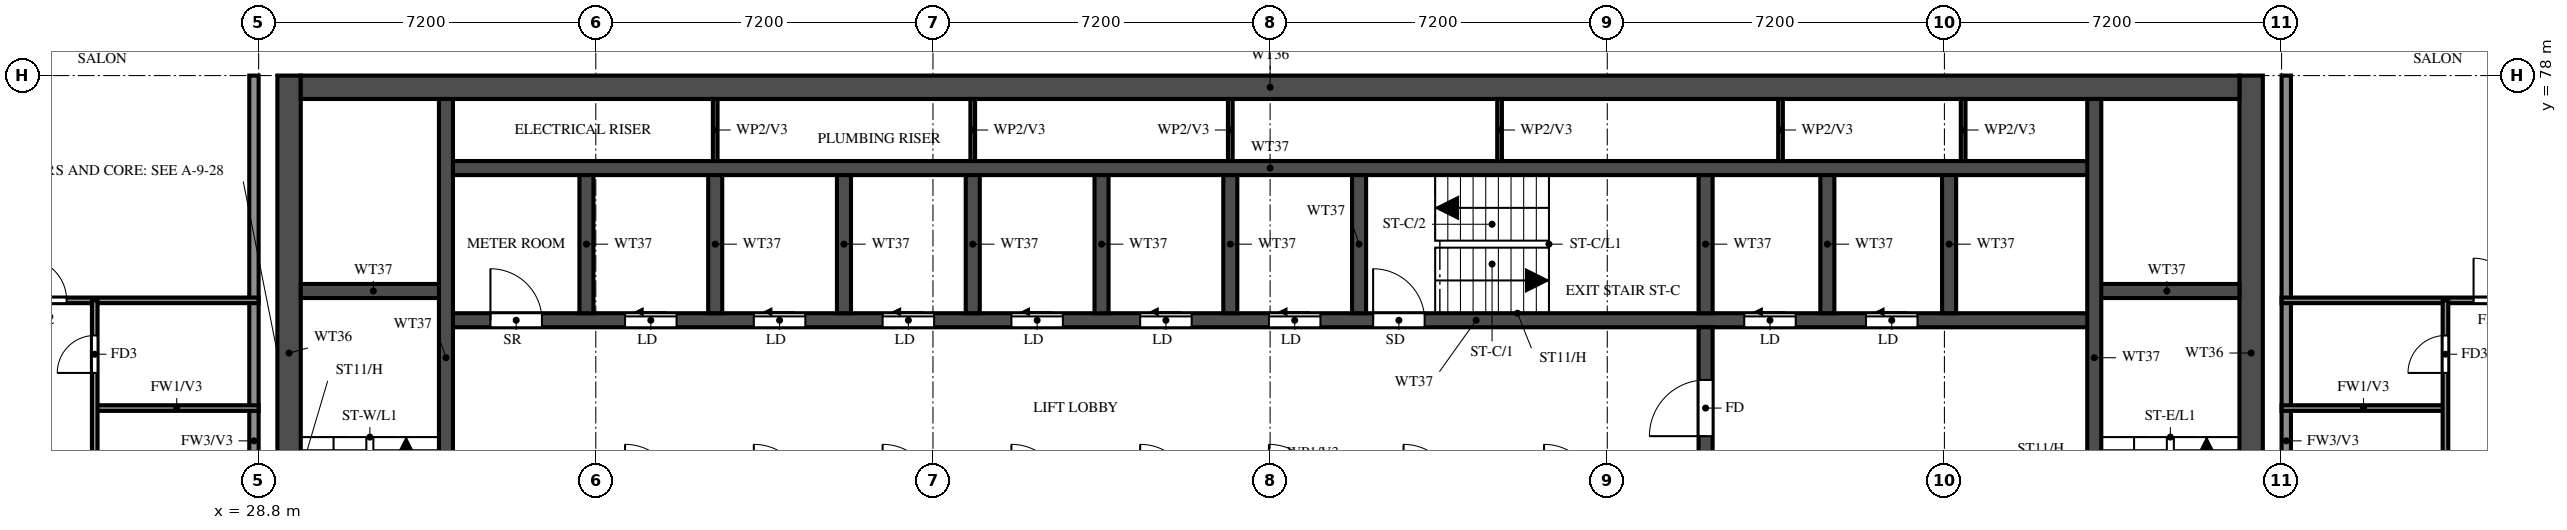
"""IFC4 building model, lengths in metres.
Left out: names, types, materials, properties, quantities, classifications, styles, units other than length and angle.
Written with IfcOpenShell. Run it as: python <this file> out.ifc"""

import sys

from ifc_helpers import new_model, si_unit, direction, frame, frame_2d, origin, place, context, subcontext, project, spatial, rectangle, extrude, element, fill, save


model = new_model("IFC4")
c1 = context("Model", 3, precision=1e-05, world=origin(), true_north=direction((0.0, 1.0)))
c2 = subcontext(c1, "Body", "Model", "MODEL_VIEW")
j1 = project(units=[si_unit("LENGTHUNIT", "METRE"), si_unit("PLANEANGLEUNIT", "RADIAN")], contexts=[c1])
p1 = place(None, origin())
s1 = spatial("IfcSite", under=j1, at=p1, CompositionType="ELEMENT")
p2 = place(p1, origin())
s2 = spatial("IfcBuilding", under=s1, at=p2, CompositionType="ELEMENT")
p3 = place(p2, frame((0.0, 0.0, 215.0)))
s3 = spatial("IfcBuildingStorey", under=s2, at=p3, CompositionType="ELEMENT", Elevation=215.0)
for number, where, z_axis, x_axis in (
    (1, (29.45, 66.15, 0.0), (0.0, 0.0, 1.0), (0.0, 1.0, 0.0)),
    (2, (71.35, 66.15, 0.0), (0.0, 0.0, 1.0), (0.0, 1.0, 0.0)),
):
    element("IfcWall", number, at=place(p3, frame(where, z_axis=z_axis, x_axis=x_axis)), inside=s3, PredefinedType="SHEAR", context=c2, shape_type="SweptSolid", body=[
        extrude(rectangle(XDim=11.85, YDim=0.5, at=frame_2d((5.925, 0.0))), origin(), (0.0, 0.0, 1.0), 3.22),
    ])
p4 = place(p3, frame((29.7, 77.75, 0.0), z_axis=(0.0, 0.0, 1.0), x_axis=(1.0, 0.0, 0.0)))
e3 = element("IfcWall", 3, at=p4, inside=s3, PredefinedType="SHEAR", context=c2, shape_type="SweptSolid", body=[
    extrude(rectangle(XDim=41.4, YDim=0.5, at=frame_2d((20.7, 0.0))), origin(), (0.0, 0.0, 1.0), 3.22),
])
p5 = place(p3, frame((32.8, 72.775, 0.0), z_axis=(0.0, 0.0, 1.0), x_axis=(1.0, 0.0, 0.0)))
e4 = element("IfcWall", 4, at=p5, inside=s3, PredefinedType="SHEAR", context=c2, shape_type="SweptSolid", body=[
    extrude(rectangle(XDim=35.2, YDim=0.3, at=frame_2d((17.6, 0.0))), origin(), (0.0, 0.0, 1.0), 3.22),
])
p6 = place(p5, frame((19.8, 0.0, 0.0)))
e5 = element("IfcOpeningElement", 5, at=p6, cuts=e4, PredefinedType="OPENING", context=c2, shape_type="SweptSolid", body=[
    extrude(rectangle(XDim=1.1, YDim=2.1, at=frame_2d((0.55, 1.05))), frame((0.0, 0.16, 0.0), z_axis=(0.0, -1.0, 0.0), x_axis=(1.0, 0.0, 0.0)), (0.0, 0.0, 1.0), 0.32),
])
p7 = place(p5, frame((27.725, 0.0, 0.0)))
e6 = element("IfcOpeningElement", 6, at=p7, cuts=e4, PredefinedType="OPENING", context=c2, shape_type="SweptSolid", body=[
    extrude(rectangle(XDim=1.1, YDim=2.1, at=frame_2d((0.55, 1.05))), frame((0.0, 0.16, 0.0), z_axis=(0.0, -1.0, 0.0), x_axis=(1.0, 0.0, 0.0)), (0.0, 0.0, 1.0), 0.32),
])
p8 = place(p5, frame((30.325, 0.0, 0.0)))
e7 = element("IfcOpeningElement", 7, at=p8, cuts=e4, PredefinedType="OPENING", context=c2, shape_type="SweptSolid", body=[
    extrude(rectangle(XDim=1.1, YDim=2.1, at=frame_2d((0.55, 1.05))), frame((0.0, 0.16, 0.0), z_axis=(0.0, -1.0, 0.0), x_axis=(1.0, 0.0, 0.0)), (0.0, 0.0, 1.0), 0.32),
])
p9 = place(p5, frame((3.825, 0.0, 0.0)))
e8 = element("IfcOpeningElement", 8, at=p9, cuts=e4, PredefinedType="OPENING", context=c2, shape_type="SweptSolid", body=[
    extrude(rectangle(XDim=1.1, YDim=2.1, at=frame_2d((0.55, 1.05))), frame((0.0, 0.16, 0.0), z_axis=(0.0, -1.0, 0.0), x_axis=(1.0, 0.0, 0.0)), (0.0, 0.0, 1.0), 0.32),
])
p10 = place(p5, frame((6.575, 0.0, 0.0)))
e9 = element("IfcOpeningElement", 9, at=p10, cuts=e4, PredefinedType="OPENING", context=c2, shape_type="SweptSolid", body=[
    extrude(rectangle(XDim=1.1, YDim=2.1, at=frame_2d((0.55, 1.05))), frame((0.0, 0.16, 0.0), z_axis=(0.0, -1.0, 0.0), x_axis=(1.0, 0.0, 0.0)), (0.0, 0.0, 1.0), 0.32),
])
p11 = place(p5, frame((9.325, 0.0, 0.0)))
e10 = element("IfcOpeningElement", 10, at=p11, cuts=e4, PredefinedType="OPENING", context=c2, shape_type="SweptSolid", body=[
    extrude(rectangle(XDim=1.1, YDim=2.1, at=frame_2d((0.55, 1.05))), frame((0.0, 0.16, 0.0), z_axis=(0.0, -1.0, 0.0), x_axis=(1.0, 0.0, 0.0)), (0.0, 0.0, 1.0), 0.32),
])
p12 = place(p5, frame((12.075, 0.0, 0.0)))
e11 = element("IfcOpeningElement", 11, at=p12, cuts=e4, PredefinedType="OPENING", context=c2, shape_type="SweptSolid", body=[
    extrude(rectangle(XDim=1.1, YDim=2.1, at=frame_2d((0.55, 1.05))), frame((0.0, 0.16, 0.0), z_axis=(0.0, -1.0, 0.0), x_axis=(1.0, 0.0, 0.0)), (0.0, 0.0, 1.0), 0.32),
])
p13 = place(p5, frame((14.825, 0.0, 0.0)))
e12 = element("IfcOpeningElement", 12, at=p13, cuts=e4, PredefinedType="OPENING", context=c2, shape_type="SweptSolid", body=[
    extrude(rectangle(XDim=1.1, YDim=2.1, at=frame_2d((0.55, 1.05))), frame((0.0, 0.16, 0.0), z_axis=(0.0, -1.0, 0.0), x_axis=(1.0, 0.0, 0.0)), (0.0, 0.0, 1.0), 0.32),
])
p14 = place(p5, frame((17.575, 0.0, 0.0)))
e13 = element("IfcOpeningElement", 13, at=p14, cuts=e4, PredefinedType="OPENING", context=c2, shape_type="SweptSolid", body=[
    extrude(rectangle(XDim=1.1, YDim=2.1, at=frame_2d((0.55, 1.05))), frame((0.0, 0.16, 0.0), z_axis=(0.0, -1.0, 0.0), x_axis=(1.0, 0.0, 0.0)), (0.0, 0.0, 1.0), 0.32),
])
p15 = place(p5, frame((0.95, 0.0, 0.0)))
e14 = element("IfcOpeningElement", 14, at=p15, cuts=e4, PredefinedType="OPENING", context=c2, shape_type="SweptSolid", body=[
    extrude(rectangle(XDim=1.1, YDim=2.1, at=frame_2d((0.55, 1.05))), frame((0.0, 0.16, 0.0), z_axis=(0.0, -1.0, 0.0), x_axis=(1.0, 0.0, 0.0)), (0.0, 0.0, 1.0), 0.32),
])
p16 = place(p3, frame((32.8, 76.025, 0.0), z_axis=(0.0, 0.0, 1.0), x_axis=(1.0, 0.0, 0.0)))
e15 = element("IfcWall", 15, at=p16, inside=s3, PredefinedType="SHEAR", context=c2, shape_type="SweptSolid", body=[
    extrude(rectangle(XDim=35.2, YDim=0.3, at=frame_2d((17.6, 0.0))), origin(), (0.0, 0.0, 1.0), 3.22),
])
for number, where, z_axis, x_axis in (
    (16, (29.7, 73.4, 0.0), (0.0, 0.0, 1.0), (1.0, 0.0, 0.0)),
    (17, (68.0, 73.4, 0.0), (0.0, 0.0, 1.0), (1.0, 0.0, 0.0)),
):
    element("IfcWall", number, at=place(p3, frame(where, z_axis=z_axis, x_axis=x_axis)), inside=s3, PredefinedType="SHEAR", context=c2, shape_type="SweptSolid", body=[
        extrude(rectangle(XDim=3.1, YDim=0.3, at=frame_2d((1.55, 0.0))), origin(), (0.0, 0.0, 1.0), 3.22),
    ])
p17 = place(p3, frame((32.8, 66.45, 0.0), z_axis=(0.0, 0.0, 1.0), x_axis=(0.0, 1.0, 0.0)))
e18 = element("IfcWall", 18, at=p17, inside=s3, PredefinedType="SHEAR", context=c2, shape_type="SweptSolid", body=[
    extrude(rectangle(XDim=11.05, YDim=0.3, at=frame_2d((5.525, 0.0))), origin(), (0.0, 0.0, 1.0), 3.22),
])
p18 = place(p3, frame((68.0, 66.45, 0.0), z_axis=(0.0, 0.0, 1.0), x_axis=(0.0, 1.0, 0.0)))
e19 = element("IfcWall", 19, at=p18, inside=s3, PredefinedType="SHEAR", context=c2, shape_type="SweptSolid", body=[
    extrude(rectangle(XDim=11.05, YDim=0.3, at=frame_2d((5.525, 0.0))), origin(), (0.0, 0.0, 1.0), 3.22),
])
p19 = place(p18, frame((0.15, 0.0, 0.0)))
e20 = element("IfcOpeningElement", 20, at=p19, cuts=e19, PredefinedType="OPENING", context=c2, shape_type="SweptSolid", body=[
    extrude(rectangle(XDim=1.1, YDim=2.1, at=frame_2d((0.55, 1.05))), frame((0.0, 0.16, 0.0), z_axis=(0.0, -1.0, 0.0), x_axis=(1.0, 0.0, 0.0)), (0.0, 0.0, 1.0), 0.32),
])
p20 = place(p3, frame((59.7, 66.45, 0.0), z_axis=(0.0, 0.0, 1.0), x_axis=(0.0, 1.0, 0.0)))
e21 = element("IfcWall", 21, at=p20, inside=s3, PredefinedType="SHEAR", context=c2, shape_type="SweptSolid", body=[
    extrude(rectangle(XDim=6.175, YDim=0.3, at=frame_2d((3.087, 0.0))), origin(), (0.0, 0.0, 1.0), 3.22),
])
p21 = place(p20, frame((3.85, 0.0, 0.0)))
e22 = element("IfcOpeningElement", 22, at=p21, cuts=e21, PredefinedType="OPENING", context=c2, shape_type="SweptSolid", body=[
    extrude(rectangle(XDim=1.2, YDim=2.1, at=frame_2d((0.6, 1.05))), frame((0.0, 0.16, 0.0), z_axis=(0.0, -1.0, 0.0), x_axis=(1.0, 0.0, 0.0)), (0.0, 0.0, 1.0), 0.32),
])
for number, where, z_axis, x_axis in (
    (23, (59.7, 72.925, 0.0), (0.0, 0.0, 1.0), (0.0, 1.0, 0.0)),
    (24, (35.8, 72.925, 0.0), (0.0, 0.0, 1.0), (0.0, 1.0, 0.0)),
    (25, (38.55, 72.925, 0.0), (0.0, 0.0, 1.0), (0.0, 1.0, 0.0)),
    (26, (41.3, 72.925, 0.0), (0.0, 0.0, 1.0), (0.0, 1.0, 0.0)),
    (27, (44.05, 72.925, 0.0), (0.0, 0.0, 1.0), (0.0, 1.0, 0.0)),
    (28, (46.8, 72.925, 0.0), (0.0, 0.0, 1.0), (0.0, 1.0, 0.0)),
    (29, (49.55, 72.925, 0.0), (0.0, 0.0, 1.0), (0.0, 1.0, 0.0)),
    (30, (52.3, 72.925, 0.0), (0.0, 0.0, 1.0), (0.0, 1.0, 0.0)),
    (31, (62.3, 72.925, 0.0), (0.0, 0.0, 1.0), (0.0, 1.0, 0.0)),
    (32, (64.9, 72.925, 0.0), (0.0, 0.0, 1.0), (0.0, 1.0, 0.0)),
):
    element("IfcWall", number, at=place(p3, frame(where, z_axis=z_axis, x_axis=x_axis)), inside=s3, PredefinedType="SHEAR", context=c2, shape_type="SweptSolid", body=[
        extrude(rectangle(XDim=2.95, YDim=0.3, at=frame_2d((1.475, 0.0))), origin(), (0.0, 0.0, 1.0), 3.22),
    ])
for number, where, z_axis, x_axis in (
    (33, (38.55, 76.175, 0.0), (0.0, 0.0, 1.0), (0.0, 1.0, 0.0)),
    (34, (44.05, 76.175, 0.0), (0.0, 0.0, 1.0), (0.0, 1.0, 0.0)),
    (35, (49.55, 76.175, 0.0), (0.0, 0.0, 1.0), (0.0, 1.0, 0.0)),
    (36, (55.3, 76.175, 0.0), (0.0, 0.0, 1.0), (0.0, 1.0, 0.0)),
    (37, (61.3, 76.175, 0.0), (0.0, 0.0, 1.0), (0.0, 1.0, 0.0)),
    (38, (65.2, 76.175, 0.0), (0.0, 0.0, 1.0), (0.0, 1.0, 0.0)),
):
    element("IfcWall", number, at=place(p3, frame(where, z_axis=z_axis, x_axis=x_axis)), inside=s3, PredefinedType="PARTITIONING", context=c2, shape_type="SweptSolid", body=[
        extrude(rectangle(XDim=1.325, YDim=0.1, at=frame_2d((0.663, 0.0))), origin(), (0.0, 0.0, 1.0), 3.22),
    ])
for number, where, z_axis, x_axis in (
    (39, (28.7, 62.4, 0.0), (0.0, 0.0, 1.0), (0.0, 1.0, 0.0)),
    (40, (72.1, 62.4, 0.0), (0.0, 0.0, 1.0), (0.0, 1.0, 0.0)),
):
    element("IfcWall", number, at=place(p3, frame(where, z_axis=z_axis, x_axis=x_axis)), inside=s3, PredefinedType="SOLIDWALL", context=c2, shape_type="SweptSolid", body=[
        extrude(rectangle(XDim=15.6, YDim=0.2, at=frame_2d((7.8, 0.0))), origin(), (0.0, 0.0, 1.0), 3.22),
    ])
for number, where, z_axis, x_axis in (
    (41, (25.3, 70.9, 0.0), (0.0, 0.0, 1.0), (1.0, 0.0, 0.0)),
    (42, (72.0, 70.9, 0.0), (0.0, 0.0, 1.0), (1.0, 0.0, 0.0)),
):
    element("IfcWall", number, at=place(p3, frame(where, z_axis=z_axis, x_axis=x_axis)), inside=s3, PredefinedType="PARTITIONING", context=c2, shape_type="SweptSolid", body=[
        extrude(rectangle(XDim=3.5, YDim=0.12, at=frame_2d((1.75, 0.0))), origin(), (0.0, 0.0, 1.0), 3.22),
    ])
p22 = place(p3, frame((18.525, 73.2, 0.0), z_axis=(0.0, 0.0, 1.0), x_axis=(1.0, 0.0, 0.0)))
e43 = element("IfcWall", 43, at=p22, inside=s3, PredefinedType="PARTITIONING", context=c2, shape_type="SweptSolid", body=[
    extrude(rectangle(XDim=10.275, YDim=0.12, at=frame_2d((5.138, 0.0))), origin(), (0.0, 0.0, 1.0), 2.32),
])
p23 = place(p22, frame((5.275, 0.0, 0.0)))
e44 = element("IfcOpeningElement", 44, at=p23, cuts=e43, PredefinedType="OPENING", context=c2, shape_type="SweptSolid", body=[
    extrude(rectangle(XDim=0.9, YDim=2.1, at=frame_2d((0.45, 1.05))), frame((0.0, 0.07, 0.0), z_axis=(0.0, -1.0, 0.0), x_axis=(1.0, 0.0, 0.0)), (0.0, 0.0, 1.0), 0.14),
])
p24 = place(p3, frame((72.0, 73.2, 0.0), z_axis=(0.0, 0.0, 1.0), x_axis=(1.0, 0.0, 0.0)))
e45 = element("IfcWall", 45, at=p24, inside=s3, PredefinedType="PARTITIONING", context=c2, shape_type="SweptSolid", body=[
    extrude(rectangle(XDim=10.275, YDim=0.12, at=frame_2d((5.137, 0.0))), origin(), (0.0, 0.0, 1.0), 2.32),
])
p25 = place(p24, frame((4.1, 0.0, 0.0)))
e46 = element("IfcOpeningElement", 46, at=p25, cuts=e45, PredefinedType="OPENING", context=c2, shape_type="SweptSolid", body=[
    extrude(rectangle(XDim=0.9, YDim=2.1, at=frame_2d((0.45, 1.05))), frame((0.0, 0.07, 0.0), z_axis=(0.0, -1.0, 0.0), x_axis=(1.0, 0.0, 0.0)), (0.0, 0.0, 1.0), 0.14),
])
p26 = place(p3, frame((25.3, 61.2, 0.0), z_axis=(0.0, 0.0, 1.0), x_axis=(0.0, 1.0, 0.0)))
e47 = element("IfcWall", 47, at=p26, inside=s3, PredefinedType="PARTITIONING", context=c2, shape_type="SweptSolid", body=[
    extrude(rectangle(XDim=12.0, YDim=0.12, at=frame_2d((6.0, 0.0))), origin(), (0.0, 0.0, 1.0), 3.22),
])
p27 = place(p26, frame((4.2, 0.0, 0.0)))
e48 = element("IfcOpeningElement", 48, at=p27, cuts=e47, PredefinedType="OPENING", context=c2, shape_type="SweptSolid", body=[
    extrude(rectangle(XDim=0.9, YDim=2.1, at=frame_2d((0.45, 1.05))), frame((0.0, 0.07, 0.0), z_axis=(0.0, -1.0, 0.0), x_axis=(1.0, 0.0, 0.0)), (0.0, 0.0, 1.0), 0.14),
])
p28 = place(p26, frame((7.975, 0.0, 0.0)))
e49 = element("IfcOpeningElement", 49, at=p28, cuts=e47, PredefinedType="OPENING", context=c2, shape_type="SweptSolid", body=[
    extrude(rectangle(XDim=0.8, YDim=2.1, at=frame_2d((0.4, 1.05))), frame((0.0, 0.07, 0.0), z_axis=(0.0, -1.0, 0.0), x_axis=(1.0, 0.0, 0.0)), (0.0, 0.0, 1.0), 0.14),
])
p29 = place(p26, frame((10.45, 0.0, 0.0)))
e50 = element("IfcOpeningElement", 50, at=p29, cuts=e47, PredefinedType="OPENING", context=c2, shape_type="SweptSolid", body=[
    extrude(rectangle(XDim=0.8, YDim=2.1, at=frame_2d((0.4, 1.05))), frame((0.0, 0.07, 0.0), z_axis=(0.0, -1.0, 0.0), x_axis=(1.0, 0.0, 0.0)), (0.0, 0.0, 1.0), 0.14),
])
p30 = place(p3, frame((75.5, 61.2, 0.0), z_axis=(0.0, 0.0, 1.0), x_axis=(0.0, 1.0, 0.0)))
e51 = element("IfcWall", 51, at=p30, inside=s3, PredefinedType="PARTITIONING", context=c2, shape_type="SweptSolid", body=[
    extrude(rectangle(XDim=12.0, YDim=0.12, at=frame_2d((6.0, 0.0))), origin(), (0.0, 0.0, 1.0), 3.22),
])
p31 = place(p30, frame((4.2, 0.0, 0.0)))
e52 = element("IfcOpeningElement", 52, at=p31, cuts=e51, PredefinedType="OPENING", context=c2, shape_type="SweptSolid", body=[
    extrude(rectangle(XDim=0.9, YDim=2.1, at=frame_2d((0.45, 1.05))), frame((0.0, 0.07, 0.0), z_axis=(0.0, -1.0, 0.0), x_axis=(1.0, 0.0, 0.0)), (0.0, 0.0, 1.0), 0.14),
])
p32 = place(p30, frame((7.975, 0.0, 0.0)))
e53 = element("IfcOpeningElement", 53, at=p32, cuts=e51, PredefinedType="OPENING", context=c2, shape_type="SweptSolid", body=[
    extrude(rectangle(XDim=0.8, YDim=2.1, at=frame_2d((0.4, 1.05))), frame((0.0, 0.07, 0.0), z_axis=(0.0, -1.0, 0.0), x_axis=(1.0, 0.0, 0.0)), (0.0, 0.0, 1.0), 0.14),
])
p33 = place(p30, frame((10.45, 0.0, 0.0)))
e54 = element("IfcOpeningElement", 54, at=p33, cuts=e51, PredefinedType="OPENING", context=c2, shape_type="SweptSolid", body=[
    extrude(rectangle(XDim=0.8, YDim=2.1, at=frame_2d((0.4, 1.05))), frame((0.0, 0.07, 0.0), z_axis=(0.0, -1.0, 0.0), x_axis=(1.0, 0.0, 0.0)), (0.0, 0.0, 1.0), 0.14),
])
p34 = place(p6, origin())
e55 = element("IfcDoor", 55, at=p34, inside=s3, OperationType="SINGLE_SWING_LEFT", PredefinedType="DOOR", context=c2, shape_type="SweptSolid", body=[
    extrude(rectangle(XDim=1.1, YDim=2.1, at=frame_2d((0.55, 1.05))), frame((0.0, 0.025, 0.0), z_axis=(0.0, -1.0, 0.0), x_axis=(1.0, 0.0, 0.0)), (0.0, 0.0, 1.0), 0.05),
])
fill(e5, e55)
p35 = place(p21, origin())
e56 = element("IfcDoor", 56, at=p35, inside=s3, OperationType="SINGLE_SWING_LEFT", PredefinedType="DOOR", context=c2, shape_type="SweptSolid", body=[
    extrude(rectangle(XDim=1.2, YDim=2.1, at=frame_2d((0.6, 1.05))), frame((0.0, 0.025, 0.0), z_axis=(0.0, -1.0, 0.0), x_axis=(1.0, 0.0, 0.0)), (0.0, 0.0, 1.0), 0.05),
])
fill(e22, e56)
p36 = place(p7, origin())
e57 = element("IfcDoor", 57, at=p36, inside=s3, OperationType="SLIDING_TO_LEFT", PredefinedType="DOOR", context=c2, shape_type="SweptSolid", body=[
    extrude(rectangle(XDim=1.1, YDim=2.1, at=frame_2d((0.55, 1.05))), frame((0.0, 0.025, 0.0), z_axis=(0.0, -1.0, 0.0), x_axis=(1.0, 0.0, 0.0)), (0.0, 0.0, 1.0), 0.05),
])
fill(e6, e57)
p37 = place(p8, origin())
e58 = element("IfcDoor", 58, at=p37, inside=s3, OperationType="SLIDING_TO_LEFT", PredefinedType="DOOR", context=c2, shape_type="SweptSolid", body=[
    extrude(rectangle(XDim=1.1, YDim=2.1, at=frame_2d((0.55, 1.05))), frame((0.0, 0.025, 0.0), z_axis=(0.0, -1.0, 0.0), x_axis=(1.0, 0.0, 0.0)), (0.0, 0.0, 1.0), 0.05),
])
fill(e7, e58)
p38 = place(p9, origin())
e59 = element("IfcDoor", 59, at=p38, inside=s3, OperationType="SLIDING_TO_LEFT", PredefinedType="DOOR", context=c2, shape_type="SweptSolid", body=[
    extrude(rectangle(XDim=1.1, YDim=2.1, at=frame_2d((0.55, 1.05))), frame((0.0, 0.025, 0.0), z_axis=(0.0, -1.0, 0.0), x_axis=(1.0, 0.0, 0.0)), (0.0, 0.0, 1.0), 0.05),
])
fill(e8, e59)
p39 = place(p10, origin())
e60 = element("IfcDoor", 60, at=p39, inside=s3, OperationType="SLIDING_TO_LEFT", PredefinedType="DOOR", context=c2, shape_type="SweptSolid", body=[
    extrude(rectangle(XDim=1.1, YDim=2.1, at=frame_2d((0.55, 1.05))), frame((0.0, 0.025, 0.0), z_axis=(0.0, -1.0, 0.0), x_axis=(1.0, 0.0, 0.0)), (0.0, 0.0, 1.0), 0.05),
])
fill(e9, e60)
p40 = place(p11, origin())
e61 = element("IfcDoor", 61, at=p40, inside=s3, OperationType="SLIDING_TO_LEFT", PredefinedType="DOOR", context=c2, shape_type="SweptSolid", body=[
    extrude(rectangle(XDim=1.1, YDim=2.1, at=frame_2d((0.55, 1.05))), frame((0.0, 0.025, 0.0), z_axis=(0.0, -1.0, 0.0), x_axis=(1.0, 0.0, 0.0)), (0.0, 0.0, 1.0), 0.05),
])
fill(e10, e61)
p41 = place(p12, origin())
e62 = element("IfcDoor", 62, at=p41, inside=s3, OperationType="SLIDING_TO_LEFT", PredefinedType="DOOR", context=c2, shape_type="SweptSolid", body=[
    extrude(rectangle(XDim=1.1, YDim=2.1, at=frame_2d((0.55, 1.05))), frame((0.0, 0.025, 0.0), z_axis=(0.0, -1.0, 0.0), x_axis=(1.0, 0.0, 0.0)), (0.0, 0.0, 1.0), 0.05),
])
fill(e11, e62)
p42 = place(p13, origin())
e63 = element("IfcDoor", 63, at=p42, inside=s3, OperationType="SLIDING_TO_LEFT", PredefinedType="DOOR", context=c2, shape_type="SweptSolid", body=[
    extrude(rectangle(XDim=1.1, YDim=2.1, at=frame_2d((0.55, 1.05))), frame((0.0, 0.025, 0.0), z_axis=(0.0, -1.0, 0.0), x_axis=(1.0, 0.0, 0.0)), (0.0, 0.0, 1.0), 0.05),
])
fill(e12, e63)
p43 = place(p14, origin())
e64 = element("IfcDoor", 64, at=p43, inside=s3, OperationType="SLIDING_TO_LEFT", PredefinedType="DOOR", context=c2, shape_type="SweptSolid", body=[
    extrude(rectangle(XDim=1.1, YDim=2.1, at=frame_2d((0.55, 1.05))), frame((0.0, 0.025, 0.0), z_axis=(0.0, -1.0, 0.0), x_axis=(1.0, 0.0, 0.0)), (0.0, 0.0, 1.0), 0.05),
])
fill(e13, e64)
p44 = place(p15, origin())
e65 = element("IfcDoor", 65, at=p44, inside=s3, OperationType="SINGLE_SWING_LEFT", PredefinedType="DOOR", context=c2, shape_type="SweptSolid", body=[
    extrude(rectangle(XDim=1.1, YDim=2.1, at=frame_2d((0.55, 1.05))), frame((0.0, 0.025, 0.0), z_axis=(0.0, -1.0, 0.0), x_axis=(1.0, 0.0, 0.0)), (0.0, 0.0, 1.0), 0.05),
])
fill(e14, e65)
p45 = place(p23, origin())
e66 = element("IfcDoor", 66, at=p45, inside=s3, OperationType="SINGLE_SWING_RIGHT", PredefinedType="DOOR", context=c2, shape_type="SweptSolid", body=[
    extrude(rectangle(XDim=0.9, YDim=2.1, at=frame_2d((0.45, 1.05))), frame((0.0, 0.025, 0.0), z_axis=(0.0, -1.0, 0.0), x_axis=(1.0, 0.0, 0.0)), (0.0, 0.0, 1.0), 0.05),
])
fill(e44, e66)
p46 = place(p29, origin())
e67 = element("IfcDoor", 67, at=p46, inside=s3, OperationType="SINGLE_SWING_LEFT", PredefinedType="DOOR", context=c2, shape_type="SweptSolid", body=[
    extrude(rectangle(XDim=0.8, YDim=2.1, at=frame_2d((0.4, 1.05))), frame((0.0, 0.025, 0.0), z_axis=(0.0, -1.0, 0.0), x_axis=(1.0, 0.0, 0.0)), (0.0, 0.0, 1.0), 0.05),
])
fill(e50, e67)
p47 = place(p25, origin())
e68 = element("IfcDoor", 68, at=p47, inside=s3, OperationType="SINGLE_SWING_LEFT", PredefinedType="DOOR", context=c2, shape_type="SweptSolid", body=[
    extrude(rectangle(XDim=0.9, YDim=2.1, at=frame_2d((0.45, 1.05))), frame((0.0, 0.025, 0.0), z_axis=(0.0, -1.0, 0.0), x_axis=(1.0, 0.0, 0.0)), (0.0, 0.0, 1.0), 0.05),
])
fill(e46, e68)
p48 = place(p33, origin())
e69 = element("IfcDoor", 69, at=p48, inside=s3, OperationType="SINGLE_SWING_LEFT", PredefinedType="DOOR", context=c2, shape_type="SweptSolid", body=[
    extrude(rectangle(XDim=0.8, YDim=2.1, at=frame_2d((0.4, 1.05))), frame((0.0, 0.025, 0.0), z_axis=(0.0, -1.0, 0.0), x_axis=(1.0, 0.0, 0.0)), (0.0, 0.0, 1.0), 0.05),
])
fill(e54, e69)
save(model, sys.argv[1])
